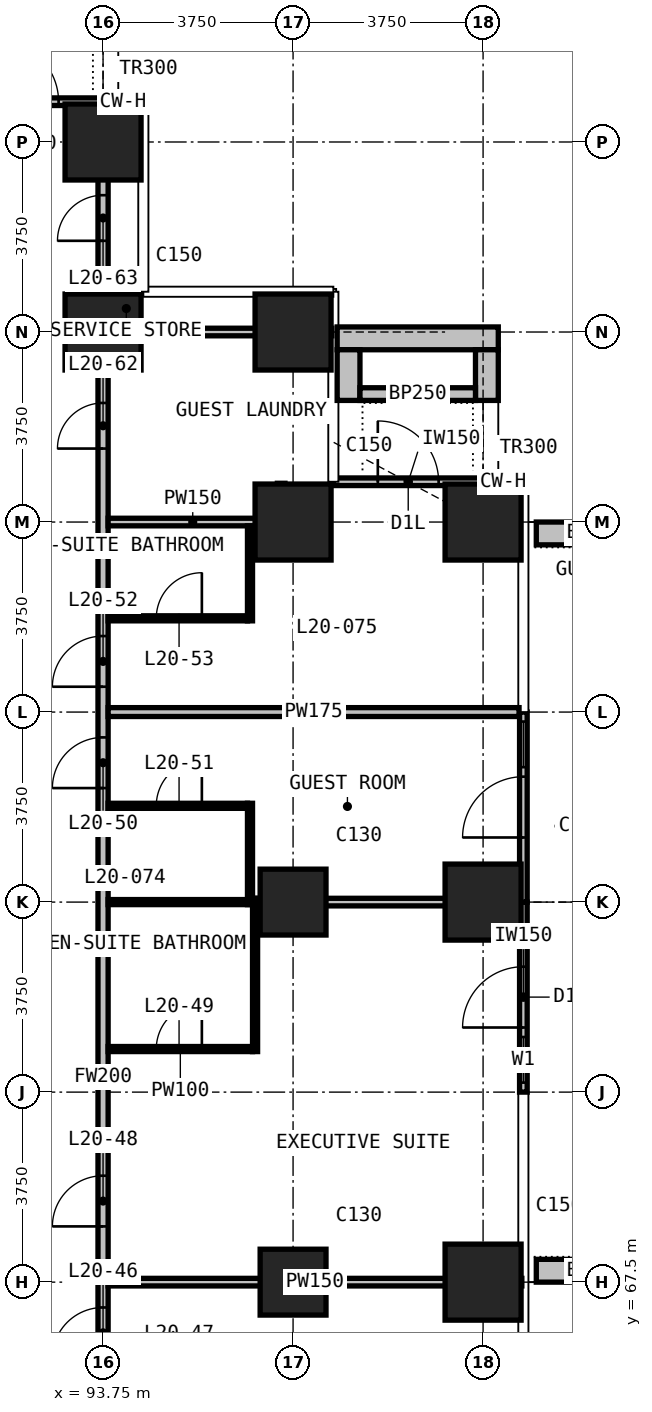
"""IFC4 building model, lengths in metres.
Left out: names, types, materials, properties, quantities, classifications, styles, units other than length and angle.
Written with IfcOpenShell. Run it as: python <this file> out.ifc"""

import sys

from ifc_helpers import new_model, si_unit, direction, frame, frame_2d, origin, origin_2d, place, context, subcontext, project, spatial, rectangle, extrude, element, fill, save


model = new_model("IFC4")
c1 = context("Model", 3, precision=1e-05, world=origin(), true_north=direction((0.0, 1.0)))
c2 = subcontext(c1, "Body", "Model", "MODEL_VIEW")
j1 = project(units=[si_unit("LENGTHUNIT", "METRE"), si_unit("PLANEANGLEUNIT", "RADIAN")], contexts=[c1])
p1 = place(None, origin())
s1 = spatial("IfcSite", under=j1, at=p1, CompositionType="ELEMENT")
p2 = place(p1, origin())
s2 = spatial("IfcBuilding", under=s1, at=p2, CompositionType="ELEMENT")
p3 = place(p2, frame((0.0, 0.0, 85.7)))
s3 = spatial("IfcBuildingStorey", under=s2, at=p3, CompositionType="ELEMENT", Elevation=85.7)
for number, where, z_axis, x_axis in (
    (1, (93.75, 86.25, 0.0), (0.0, 0.0, 1.0), (1.0, 0.0, 0.0)),
    (2, (93.75, 90.0, 0.0), (0.0, 0.0, 1.0), (1.0, 0.0, 0.0)),
):
    element("IfcColumn", number, at=place(p3, frame(where, z_axis=z_axis, x_axis=x_axis)), inside=s3, PredefinedType="COLUMN", context=c2, shape_type="SweptSolid", body=[
        extrude(rectangle(XDim=1.5, YDim=1.5, at=origin_2d()), origin(), (0.0, 0.0, 1.0), 3.3),
    ])
for number, where, z_axis, x_axis in (
    (3, (97.5, 67.5, 0.0), (0.0, 0.0, 1.0), (1.0, 0.0, 0.0)),
    (4, (97.5, 75.0, 0.0), (0.0, 0.0, 1.0), (1.0, 0.0, 0.0)),
):
    element("IfcColumn", number, at=place(p3, frame(where, z_axis=z_axis, x_axis=x_axis)), inside=s3, PredefinedType="COLUMN", context=c2, shape_type="SweptSolid", body=[
        extrude(rectangle(XDim=1.3, YDim=1.3, at=origin_2d()), origin(), (0.0, 0.0, 1.0), 3.3),
    ])
for number, where, z_axis, x_axis in (
    (5, (97.5, 82.5, 0.0), (0.0, 0.0, 1.0), (1.0, 0.0, 0.0)),
    (6, (97.5, 86.25, 0.0), (0.0, 0.0, 1.0), (1.0, 0.0, 0.0)),
    (7, (101.25, 67.5, 0.0), (0.0, 0.0, 1.0), (1.0, 0.0, 0.0)),
    (8, (101.25, 75.0, 0.0), (0.0, 0.0, 1.0), (1.0, 0.0, 0.0)),
    (9, (101.25, 82.5, 0.0), (0.0, 0.0, 1.0), (1.0, 0.0, 0.0)),
):
    element("IfcColumn", number, at=place(p3, frame(where, z_axis=z_axis, x_axis=x_axis)), inside=s3, PredefinedType="COLUMN", context=c2, shape_type="SweptSolid", body=[
        extrude(rectangle(XDim=1.5, YDim=1.5, at=origin_2d()), origin(), (0.0, 0.0, 1.0), 3.3),
    ])
p4 = place(p3, frame((102.045, 71.25, 0.0), z_axis=(0.0, 0.0, 1.0), x_axis=(0.0, 1.0, 0.0)))
e10 = element("IfcWall", 10, at=p4, inside=s3, PredefinedType="SOLIDWALL", context=c2, shape_type="SweptSolid", body=[
    extrude(rectangle(XDim=3.75, YDim=0.15, at=frame_2d((1.875, 0.0))), origin(), (0.0, 0.0, 1.0), 3.0),
])
p5 = place(p4, frame((0.188, 0.0, 0.1)))
e11 = element("IfcOpeningElement", 11, at=p5, cuts=e10, PredefinedType="OPENING", context=c2, shape_type="SweptSolid", body=[
    extrude(rectangle(XDim=0.9, YDim=2.4, at=frame_2d((0.45, 1.2))), frame((0.0, 0.085, 0.0), z_axis=(0.0, -1.0, 0.0), x_axis=(1.0, 0.0, 0.0)), (0.0, 0.0, 1.0), 0.17),
])
p6 = place(p4, frame((1.275, 0.0, 0.0)))
e12 = element("IfcOpeningElement", 12, at=p6, cuts=e10, PredefinedType="OPENING", context=c2, shape_type="SweptSolid", body=[
    extrude(rectangle(XDim=1.2, YDim=2.4, at=frame_2d((0.6, 1.2))), frame((0.0, 0.085, 0.0), z_axis=(0.0, -1.0, 0.0), x_axis=(1.0, 0.0, 0.0)), (0.0, 0.0, 1.0), 0.17),
])
p7 = place(p3, frame((102.045, 75.0, 0.0), z_axis=(0.0, 0.0, 1.0), x_axis=(0.0, 1.0, 0.0)))
e13 = element("IfcWall", 13, at=p7, inside=s3, PredefinedType="SOLIDWALL", context=c2, shape_type="SweptSolid", body=[
    extrude(rectangle(XDim=3.75, YDim=0.15, at=frame_2d((1.875, 0.0))), origin(), (0.0, 0.0, 1.0), 3.0),
])
p8 = place(p7, frame((1.275, 0.0, 0.0)))
e14 = element("IfcOpeningElement", 14, at=p8, cuts=e13, PredefinedType="OPENING", context=c2, shape_type="SweptSolid", body=[
    extrude(rectangle(XDim=1.2, YDim=2.4, at=frame_2d((0.6, 1.2))), frame((0.0, 0.085, 0.0), z_axis=(0.0, -1.0, 0.0), x_axis=(1.0, 0.0, 0.0)), (0.0, 0.0, 1.0), 0.17),
])
p9 = place(p7, frame((2.663, 0.0, 0.1)))
e15 = element("IfcOpeningElement", 15, at=p9, cuts=e13, PredefinedType="OPENING", context=c2, shape_type="SweptSolid", body=[
    extrude(rectangle(XDim=0.9, YDim=2.4, at=frame_2d((0.45, 1.2))), frame((0.0, 0.085, 0.0), z_axis=(0.0, -1.0, 0.0), x_axis=(1.0, 0.0, 0.0)), (0.0, 0.0, 1.0), 0.17),
])
p10 = place(p3, frame((98.295, 83.295, 0.0), z_axis=(0.0, 0.0, 1.0), x_axis=(1.0, 0.0, 0.0)))
e16 = element("IfcWall", 16, at=p10, inside=s3, PredefinedType="SOLIDWALL", context=c2, shape_type="SweptSolid", body=[
    extrude(rectangle(XDim=2.955, YDim=0.15, at=frame_2d((1.478, 0.0))), origin(), (0.0, 0.0, 1.0), 3.0),
])
p11 = place(p10, frame((0.877, 0.0, 0.0)))
e17 = element("IfcOpeningElement", 17, at=p11, cuts=e16, PredefinedType="OPENING", context=c2, shape_type="SweptSolid", body=[
    extrude(rectangle(XDim=1.2, YDim=2.0, at=frame_2d((0.6, 1.0))), frame((0.0, 0.085, 0.0), z_axis=(0.0, -1.0, 0.0), x_axis=(1.0, 0.0, 0.0)), (0.0, 0.0, 1.0), 0.17),
])
p12 = place(p3, frame((90.795, 90.795, 0.0), z_axis=(0.0, 0.0, 1.0), x_axis=(1.0, 0.0, 0.0)))
e18 = element("IfcWall", 18, at=p12, inside=s3, PredefinedType="SOLIDWALL", context=c2, shape_type="SweptSolid", body=[
    extrude(rectangle(XDim=2.955, YDim=0.15, at=frame_2d((1.478, 0.0))), origin(), (0.0, 0.0, 1.0), 3.0),
])
p13 = place(p12, frame((0.877, 0.0, 0.0)))
e19 = element("IfcOpeningElement", 19, at=p13, cuts=e18, PredefinedType="OPENING", context=c2, shape_type="SweptSolid", body=[
    extrude(rectangle(XDim=1.2, YDim=2.4, at=frame_2d((0.6, 1.2))), frame((0.0, 0.085, 0.0), z_axis=(0.0, -1.0, 0.0), x_axis=(1.0, 0.0, 0.0)), (0.0, 0.0, 1.0), 0.17),
])
for number, where, z_axis, x_axis in (
    (20, (102.3, 67.725, 0.0), (0.0, 0.0, 1.0), (1.0, 0.0, 0.0)),
    (21, (102.3, 82.275, 0.0), (0.0, 0.0, 1.0), (1.0, 0.0, 0.0)),
):
    element("IfcWall", number, at=place(p3, frame(where, z_axis=z_axis, x_axis=x_axis)), inside=s3, PredefinedType="USERDEFINED", context=c2, shape_type="SweptSolid", body=[
        extrude(rectangle(XDim=2.35, YDim=0.45, at=frame_2d((1.175, 0.0))), origin(), (0.0, 0.0, 1.0), 1.1),
    ])
p14 = place(p3, frame((98.37, 86.125, 0.0), z_axis=(0.0, 0.0, 1.0), x_axis=(1.0, 0.0, 0.0)))
e22 = element("IfcWall", 22, at=p14, inside=s3, PredefinedType="USERDEFINED", context=c2, shape_type="SweptSolid", body=[
    extrude(rectangle(XDim=3.18, YDim=0.45, at=frame_2d((1.59, 0.0))), origin(), (0.0, 0.0, 1.0), 1.1),
])
for number, where, z_axis, x_axis in (
    (23, (98.595, 84.9, 0.0), (0.0, 0.0, 1.0), (0.0, 1.0, 0.0)),
    (24, (101.325, 84.9, 0.0), (0.0, 0.0, 1.0), (0.0, 1.0, 0.0)),
):
    element("IfcWall", number, at=place(p3, frame(where, z_axis=z_axis, x_axis=x_axis)), inside=s3, PredefinedType="USERDEFINED", context=c2, shape_type="SweptSolid", body=[
        extrude(rectangle(XDim=1.0, YDim=0.45, at=frame_2d((0.5, 0.0))), origin(), (0.0, 0.0, 1.0), 1.1),
    ])
p15 = place(p3, frame((98.82, 85.025, 0.0), z_axis=(0.0, 0.0, 1.0), x_axis=(1.0, 0.0, 0.0)))
e25 = element("IfcWall", 25, at=p15, inside=s3, PredefinedType="USERDEFINED", context=c2, shape_type="SweptSolid", body=[
    extrude(rectangle(XDim=2.28, YDim=0.25, at=frame_2d((1.14, 0.0))), origin(), (0.0, 0.0, 1.0), 1.0),
])
p16 = place(p3, frame((93.75, 52.4, 0.0), z_axis=(0.0, 0.0, 1.0), x_axis=(0.0, 1.0, 0.0)))
e26 = element("IfcWall", 26, at=p16, inside=s3, PredefinedType="PARTITIONING", context=c2, shape_type="SweptSolid", body=[
    extrude(rectangle(XDim=38.31, YDim=0.2, at=frame_2d((19.155, 0.0))), origin(), (0.0, 0.0, 1.0), 3.0),
])
p17 = place(p16, frame((5.5, 0.0, 0.0)))
e27 = element("IfcOpeningElement", 27, at=p17, cuts=e26, PredefinedType="OPENING", context=c2, shape_type="SweptSolid", body=[
    extrude(rectangle(XDim=1.0, YDim=2.2, at=frame_2d((0.5, 1.1))), frame((0.0, 0.11, 0.0), z_axis=(0.0, -1.0, 0.0), x_axis=(1.0, 0.0, 0.0)), (0.0, 0.0, 1.0), 0.22),
])
p18 = place(p16, frame((8.1, 0.0, 0.0)))
e28 = element("IfcOpeningElement", 28, at=p18, cuts=e26, PredefinedType="OPENING", context=c2, shape_type="SweptSolid", body=[
    extrude(rectangle(XDim=1.0, YDim=2.2, at=frame_2d((0.5, 1.1))), frame((0.0, 0.11, 0.0), z_axis=(0.0, -1.0, 0.0), x_axis=(1.0, 0.0, 0.0)), (0.0, 0.0, 1.0), 0.22),
])
p19 = place(p16, frame((13.6, 0.0, 0.0)))
e29 = element("IfcOpeningElement", 29, at=p19, cuts=e26, PredefinedType="OPENING", context=c2, shape_type="SweptSolid", body=[
    extrude(rectangle(XDim=1.0, YDim=2.2, at=frame_2d((0.5, 1.1))), frame((0.0, 0.11, 0.0), z_axis=(0.0, -1.0, 0.0), x_axis=(1.0, 0.0, 0.0)), (0.0, 0.0, 1.0), 0.22),
])
p20 = place(p16, frame((16.2, 0.0, 0.0)))
e30 = element("IfcOpeningElement", 30, at=p20, cuts=e26, PredefinedType="OPENING", context=c2, shape_type="SweptSolid", body=[
    extrude(rectangle(XDim=1.0, YDim=2.2, at=frame_2d((0.5, 1.1))), frame((0.0, 0.11, 0.0), z_axis=(0.0, -1.0, 0.0), x_axis=(1.0, 0.0, 0.0)), (0.0, 0.0, 1.0), 0.22),
])
p21 = place(p16, frame((24.85, 0.0, 0.0)))
e31 = element("IfcOpeningElement", 31, at=p21, cuts=e26, PredefinedType="OPENING", context=c2, shape_type="SweptSolid", body=[
    extrude(rectangle(XDim=1.0, YDim=2.2, at=frame_2d((0.5, 1.1))), frame((0.0, 0.11, 0.0), z_axis=(0.0, -1.0, 0.0), x_axis=(1.0, 0.0, 0.0)), (0.0, 0.0, 1.0), 0.22),
])
p22 = place(p16, frame((26.85, 0.0, 0.0)))
e32 = element("IfcOpeningElement", 32, at=p22, cuts=e26, PredefinedType="OPENING", context=c2, shape_type="SweptSolid", body=[
    extrude(rectangle(XDim=1.0, YDim=2.2, at=frame_2d((0.5, 1.1))), frame((0.0, 0.11, 0.0), z_axis=(0.0, -1.0, 0.0), x_axis=(1.0, 0.0, 0.0)), (0.0, 0.0, 1.0), 0.22),
])
p23 = place(p16, frame((31.55, 0.0, 0.0)))
e33 = element("IfcOpeningElement", 33, at=p23, cuts=e26, PredefinedType="OPENING", context=c2, shape_type="SweptSolid", body=[
    extrude(rectangle(XDim=0.9, YDim=2.2, at=frame_2d((0.45, 1.1))), frame((0.0, 0.11, 0.0), z_axis=(0.0, -1.0, 0.0), x_axis=(1.0, 0.0, 0.0)), (0.0, 0.0, 1.0), 0.22),
])
p24 = place(p16, frame((35.65, 0.0, 0.0)))
e34 = element("IfcOpeningElement", 34, at=p24, cuts=e26, PredefinedType="OPENING", context=c2, shape_type="SweptSolid", body=[
    extrude(rectangle(XDim=0.9, YDim=2.2, at=frame_2d((0.45, 1.1))), frame((0.0, 0.11, 0.0), z_axis=(0.0, -1.0, 0.0), x_axis=(1.0, 0.0, 0.0)), (0.0, 0.0, 1.0), 0.22),
])
p25 = place(p3, frame((93.85, 78.75, 0.0), z_axis=(0.0, 0.0, 1.0), x_axis=(1.0, 0.0, 0.0)))
e35 = element("IfcWall", 35, at=p25, inside=s3, PredefinedType="PARTITIONING", context=c2, shape_type="SweptSolid", body=[
    extrude(rectangle(XDim=8.11, YDim=0.175, at=frame_2d((4.055, 0.0))), origin(), (0.0, 0.0, 1.0), 3.0),
])
p26 = place(p3, frame((93.85, 67.5, 0.0), z_axis=(0.0, 0.0, 1.0), x_axis=(1.0, 0.0, 0.0)))
e36 = element("IfcWall", 36, at=p26, inside=s3, PredefinedType="PARTITIONING", context=c2, shape_type="SweptSolid", body=[
    extrude(rectangle(XDim=8.165, YDim=0.15, at=frame_2d((4.083, 0.0))), origin(), (0.0, 0.0, 1.0), 3.0),
])
p27 = place(p3, frame((96.8, 75.0, 0.0), z_axis=(0.0, 0.0, 1.0), x_axis=(1.0, 0.0, 0.0)))
e37 = element("IfcWall", 37, at=p27, inside=s3, PredefinedType="PARTITIONING", context=c2, shape_type="SweptSolid", body=[
    extrude(rectangle(XDim=5.16, YDim=0.15, at=frame_2d((2.58, 0.0))), origin(), (0.0, 0.0, 1.0), 3.0),
])
p28 = place(p3, frame((93.85, 82.5, 0.0), z_axis=(0.0, 0.0, 1.0), x_axis=(1.0, 0.0, 0.0)))
e38 = element("IfcWall", 38, at=p28, inside=s3, PredefinedType="PARTITIONING", context=c2, shape_type="SweptSolid", body=[
    extrude(rectangle(XDim=3.34, YDim=0.15, at=frame_2d((1.67, 0.0))), origin(), (0.0, 0.0, 1.0), 3.0),
])
p29 = place(p3, frame((93.85, 86.25, 0.0), z_axis=(0.0, 0.0, 1.0), x_axis=(1.0, 0.0, 0.0)))
e39 = element("IfcWall", 39, at=p29, inside=s3, PredefinedType="PARTITIONING", context=c2, shape_type="SweptSolid", body=[
    extrude(rectangle(XDim=4.415, YDim=0.15, at=frame_2d((2.208, 0.0))), origin(), (0.0, 0.0, 1.0), 3.0),
])
p30 = place(p3, frame((97.265, 82.425, 0.0), z_axis=(0.0, 0.0, 1.0), x_axis=(0.0, 1.0, 0.0)))
e40 = element("IfcWall", 40, at=p30, inside=s3, PredefinedType="PARTITIONING", context=c2, shape_type="SweptSolid", body=[
    extrude(rectangle(XDim=0.84, YDim=0.15, at=frame_2d((0.42, 0.0))), origin(), (0.0, 0.0, 1.0), 3.0),
])
p31 = place(p3, frame((93.85, 72.1, 0.0), z_axis=(0.0, 0.0, 1.0), x_axis=(1.0, 0.0, 0.0)))
e41 = element("IfcWall", 41, at=p31, inside=s3, PredefinedType="PARTITIONING", context=c2, shape_type="SweptSolid", body=[
    extrude(rectangle(XDim=2.85, YDim=0.1, at=frame_2d((1.425, 0.0))), origin(), (0.0, 0.0, 1.0), 3.0),
])
p32 = place(p31, frame((0.95, 0.0, 0.0)))
e42 = element("IfcOpeningElement", 42, at=p32, cuts=e41, PredefinedType="OPENING", context=c2, shape_type="SweptSolid", body=[
    extrude(rectangle(XDim=0.9, YDim=2.2, at=frame_2d((0.45, 1.1))), frame((0.0, 0.06, 0.0), z_axis=(0.0, -1.0, 0.0), x_axis=(1.0, 0.0, 0.0)), (0.0, 0.0, 1.0), 0.12),
])
p33 = place(p3, frame((93.85, 75.0, 0.0), z_axis=(0.0, 0.0, 1.0), x_axis=(1.0, 0.0, 0.0)))
e43 = element("IfcWall", 43, at=p33, inside=s3, PredefinedType="PARTITIONING", context=c2, shape_type="SweptSolid", body=[
    extrude(rectangle(XDim=2.75, YDim=0.1, at=frame_2d((1.375, 0.0))), origin(), (0.0, 0.0, 1.0), 3.0),
])
p34 = place(p3, frame((93.85, 76.9, 0.0), z_axis=(0.0, 0.0, 1.0), x_axis=(1.0, 0.0, 0.0)))
e44 = element("IfcWall", 44, at=p34, inside=s3, PredefinedType="PARTITIONING", context=c2, shape_type="SweptSolid", body=[
    extrude(rectangle(XDim=2.75, YDim=0.1, at=frame_2d((1.375, 0.0))), origin(), (0.0, 0.0, 1.0), 3.0),
])
p35 = place(p34, frame((0.95, 0.0, 0.0)))
e45 = element("IfcOpeningElement", 45, at=p35, cuts=e44, PredefinedType="OPENING", context=c2, shape_type="SweptSolid", body=[
    extrude(rectangle(XDim=0.9, YDim=2.2, at=frame_2d((0.45, 1.1))), frame((0.0, 0.06, 0.0), z_axis=(0.0, -1.0, 0.0), x_axis=(1.0, 0.0, 0.0)), (0.0, 0.0, 1.0), 0.12),
])
p36 = place(p3, frame((93.85, 80.6, 0.0), z_axis=(0.0, 0.0, 1.0), x_axis=(1.0, 0.0, 0.0)))
e46 = element("IfcWall", 46, at=p36, inside=s3, PredefinedType="PARTITIONING", context=c2, shape_type="SweptSolid", body=[
    extrude(rectangle(XDim=2.75, YDim=0.1, at=frame_2d((1.375, 0.0))), origin(), (0.0, 0.0, 1.0), 3.0),
])
p37 = place(p36, frame((0.95, 0.0, 0.0)))
e47 = element("IfcOpeningElement", 47, at=p37, cuts=e46, PredefinedType="OPENING", context=c2, shape_type="SweptSolid", body=[
    extrude(rectangle(XDim=0.9, YDim=2.2, at=frame_2d((0.45, 1.1))), frame((0.0, 0.06, 0.0), z_axis=(0.0, -1.0, 0.0), x_axis=(1.0, 0.0, 0.0)), (0.0, 0.0, 1.0), 0.12),
])
p38 = place(p3, frame((96.65, 74.95, 0.0), z_axis=(0.0, 0.0, 1.0), x_axis=(0.0, 1.0, 0.0)))
e48 = element("IfcWall", 48, at=p38, inside=s3, PredefinedType="PARTITIONING", context=c2, shape_type="SweptSolid", body=[
    extrude(rectangle(XDim=2.0, YDim=0.1, at=frame_2d((1.0, 0.0))), origin(), (0.0, 0.0, 1.0), 3.0),
])
p39 = place(p3, frame((96.65, 80.55, 0.0), z_axis=(0.0, 0.0, 1.0), x_axis=(0.0, 1.0, 0.0)))
e49 = element("IfcWall", 49, at=p39, inside=s3, PredefinedType="PARTITIONING", context=c2, shape_type="SweptSolid", body=[
    extrude(rectangle(XDim=1.875, YDim=0.1, at=frame_2d((0.938, 0.0))), origin(), (0.0, 0.0, 1.0), 3.0),
])
p40 = place(p3, frame((96.75, 72.05, 0.0), z_axis=(0.0, 0.0, 1.0), x_axis=(0.0, 1.0, 0.0)))
e50 = element("IfcWall", 50, at=p40, inside=s3, PredefinedType="PARTITIONING", context=c2, shape_type="SweptSolid", body=[
    extrude(rectangle(XDim=3.025, YDim=0.1, at=frame_2d((1.512, 0.0))), origin(), (0.0, 0.0, 1.0), 3.0),
])
p41 = place(p5, origin())
e51 = element("IfcWindow", 51, at=p41, inside=s3, PartitioningType="SINGLE_PANEL", PredefinedType="WINDOW", context=c2, shape_type="SweptSolid", body=[
    extrude(rectangle(XDim=0.9, YDim=2.4, at=frame_2d((0.45, 1.2))), frame((0.0, 0.03, 0.0), z_axis=(0.0, -1.0, 0.0), x_axis=(1.0, 0.0, 0.0)), (0.0, 0.0, 1.0), 0.06),
])
fill(e11, e51)
p42 = place(p6, origin())
e52 = element("IfcDoor", 52, at=p42, inside=s3, OperationType="SINGLE_SWING_LEFT", PredefinedType="DOOR", context=c2, shape_type="SweptSolid", body=[
    extrude(rectangle(XDim=1.2, YDim=2.4, at=frame_2d((0.6, 1.2))), frame((0.0, 0.025, 0.0), z_axis=(0.0, -1.0, 0.0), x_axis=(1.0, 0.0, 0.0)), (0.0, 0.0, 1.0), 0.05),
])
fill(e12, e52)
p43 = place(p8, origin())
e53 = element("IfcDoor", 53, at=p43, inside=s3, OperationType="SINGLE_SWING_LEFT", PredefinedType="DOOR", context=c2, shape_type="SweptSolid", body=[
    extrude(rectangle(XDim=1.2, YDim=2.4, at=frame_2d((0.6, 1.2))), frame((0.0, 0.025, 0.0), z_axis=(0.0, -1.0, 0.0), x_axis=(1.0, 0.0, 0.0)), (0.0, 0.0, 1.0), 0.05),
])
fill(e14, e53)
p44 = place(p9, origin())
e54 = element("IfcWindow", 54, at=p44, inside=s3, PartitioningType="SINGLE_PANEL", PredefinedType="WINDOW", context=c2, shape_type="SweptSolid", body=[
    extrude(rectangle(XDim=0.9, YDim=2.4, at=frame_2d((0.45, 1.2))), frame((0.0, 0.03, 0.0), z_axis=(0.0, -1.0, 0.0), x_axis=(1.0, 0.0, 0.0)), (0.0, 0.0, 1.0), 0.06),
])
fill(e15, e54)
p45 = place(p11, origin())
e55 = element("IfcDoor", 55, at=p45, inside=s3, OperationType="SINGLE_SWING_LEFT", PredefinedType="DOOR", context=c2, shape_type="SweptSolid", body=[
    extrude(rectangle(XDim=1.2, YDim=2.0, at=frame_2d((0.6, 1.0))), frame((0.0, 0.025, 0.0), z_axis=(0.0, -1.0, 0.0), x_axis=(1.0, 0.0, 0.0)), (0.0, 0.0, 1.0), 0.05),
])
fill(e17, e55)
p46 = place(p13, origin())
e56 = element("IfcDoor", 56, at=p46, inside=s3, OperationType="SINGLE_SWING_LEFT", PredefinedType="DOOR", context=c2, shape_type="SweptSolid", body=[
    extrude(rectangle(XDim=1.2, YDim=2.4, at=frame_2d((0.6, 1.2))), frame((0.0, 0.025, 0.0), z_axis=(0.0, -1.0, 0.0), x_axis=(1.0, 0.0, 0.0)), (0.0, 0.0, 1.0), 0.05),
])
fill(e19, e56)
p47 = place(p19, origin())
e57 = element("IfcDoor", 57, at=p47, inside=s3, OperationType="SINGLE_SWING_RIGHT", PredefinedType="DOOR", context=c2, shape_type="SweptSolid", body=[
    extrude(rectangle(XDim=1.0, YDim=2.2, at=frame_2d((0.5, 1.1))), frame((0.0, 0.025, 0.0), z_axis=(0.0, -1.0, 0.0), x_axis=(1.0, 0.0, 0.0)), (0.0, 0.0, 1.0), 0.05),
])
fill(e29, e57)
p48 = place(p20, origin())
e58 = element("IfcDoor", 58, at=p48, inside=s3, OperationType="SINGLE_SWING_LEFT", PredefinedType="DOOR", context=c2, shape_type="SweptSolid", body=[
    extrude(rectangle(XDim=1.0, YDim=2.2, at=frame_2d((0.5, 1.1))), frame((0.0, 0.025, 0.0), z_axis=(0.0, -1.0, 0.0), x_axis=(1.0, 0.0, 0.0)), (0.0, 0.0, 1.0), 0.05),
])
fill(e30, e58)
p49 = place(p32, origin())
e59 = element("IfcDoor", 59, at=p49, inside=s3, OperationType="SINGLE_SWING_RIGHT", PredefinedType="DOOR", context=c2, shape_type="SweptSolid", body=[
    extrude(rectangle(XDim=0.9, YDim=2.2, at=frame_2d((0.45, 1.1))), frame((0.0, 0.025, 0.0), z_axis=(0.0, -1.0, 0.0), x_axis=(1.0, 0.0, 0.0)), (0.0, 0.0, 1.0), 0.05),
])
fill(e42, e59)
p50 = place(p21, origin())
e60 = element("IfcDoor", 60, at=p50, inside=s3, OperationType="SINGLE_SWING_LEFT", PredefinedType="DOOR", context=c2, shape_type="SweptSolid", body=[
    extrude(rectangle(XDim=1.0, YDim=2.2, at=frame_2d((0.5, 1.1))), frame((0.0, 0.025, 0.0), z_axis=(0.0, -1.0, 0.0), x_axis=(1.0, 0.0, 0.0)), (0.0, 0.0, 1.0), 0.05),
])
fill(e31, e60)
p51 = place(p35, origin())
e61 = element("IfcDoor", 61, at=p51, inside=s3, OperationType="SINGLE_SWING_RIGHT", PredefinedType="DOOR", context=c2, shape_type="SweptSolid", body=[
    extrude(rectangle(XDim=0.9, YDim=2.2, at=frame_2d((0.45, 1.1))), frame((0.0, 0.025, 0.0), z_axis=(0.0, -1.0, 0.0), x_axis=(1.0, 0.0, 0.0)), (0.0, 0.0, 1.0), 0.05),
])
fill(e45, e61)
p52 = place(p22, origin())
e62 = element("IfcDoor", 62, at=p52, inside=s3, OperationType="SINGLE_SWING_LEFT", PredefinedType="DOOR", context=c2, shape_type="SweptSolid", body=[
    extrude(rectangle(XDim=1.0, YDim=2.2, at=frame_2d((0.5, 1.1))), frame((0.0, 0.025, 0.0), z_axis=(0.0, -1.0, 0.0), x_axis=(1.0, 0.0, 0.0)), (0.0, 0.0, 1.0), 0.05),
])
fill(e32, e62)
p53 = place(p37, origin())
e63 = element("IfcDoor", 63, at=p53, inside=s3, OperationType="SINGLE_SWING_RIGHT", PredefinedType="DOOR", context=c2, shape_type="SweptSolid", body=[
    extrude(rectangle(XDim=0.9, YDim=2.2, at=frame_2d((0.45, 1.1))), frame((0.0, 0.025, 0.0), z_axis=(0.0, -1.0, 0.0), x_axis=(1.0, 0.0, 0.0)), (0.0, 0.0, 1.0), 0.05),
])
fill(e47, e63)
p54 = place(p23, origin())
e64 = element("IfcDoor", 64, at=p54, inside=s3, OperationType="SINGLE_SWING_LEFT", PredefinedType="DOOR", context=c2, shape_type="SweptSolid", body=[
    extrude(rectangle(XDim=0.9, YDim=2.2, at=frame_2d((0.45, 1.1))), frame((0.0, 0.025, 0.0), z_axis=(0.0, -1.0, 0.0), x_axis=(1.0, 0.0, 0.0)), (0.0, 0.0, 1.0), 0.05),
])
fill(e33, e64)
p55 = place(p24, origin())
e65 = element("IfcDoor", 65, at=p55, inside=s3, OperationType="SINGLE_SWING_RIGHT", PredefinedType="DOOR", context=c2, shape_type="SweptSolid", body=[
    extrude(rectangle(XDim=0.9, YDim=2.2, at=frame_2d((0.45, 1.1))), frame((0.0, 0.025, 0.0), z_axis=(0.0, -1.0, 0.0), x_axis=(1.0, 0.0, 0.0)), (0.0, 0.0, 1.0), 0.05),
])
fill(e34, e65)
save(model, sys.argv[1])
